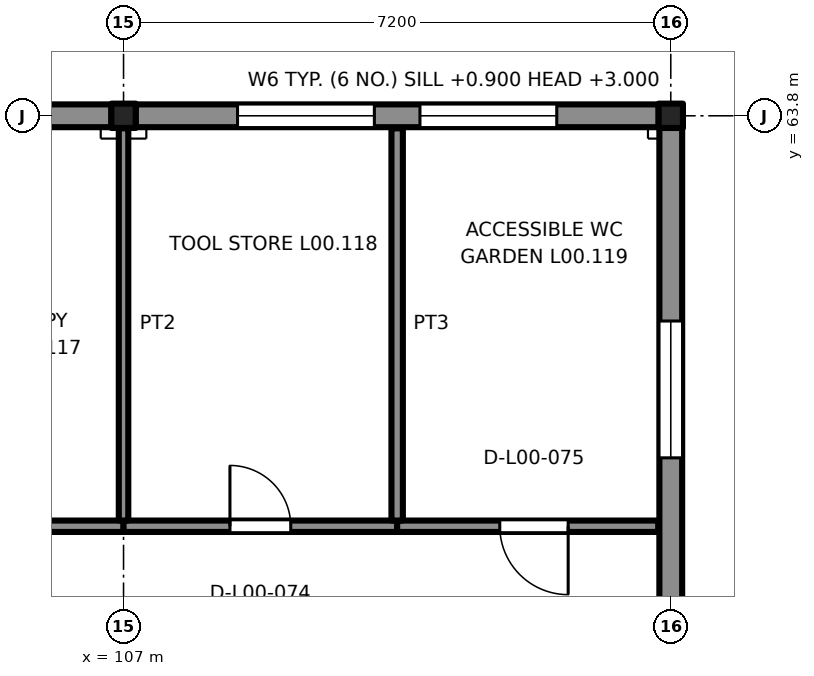
"""IFC4 building model, lengths in metres.
Left out: names, types, materials, properties, quantities, classifications, styles, units other than length and angle.
Written with IfcOpenShell. Run it as: python <this file> out.ifc"""

import sys

from ifc_helpers import new_model, si_unit, direction, frame, frame_2d, origin, origin_2d, place, context, subcontext, project, spatial, rectangle, extrude, element, fill, save


model = new_model("IFC4")
c1 = context("Model", 3, precision=1e-05, world=origin(), true_north=direction((0.0, 1.0)))
c2 = subcontext(c1, "Body", "Model", "MODEL_VIEW")
j1 = project(units=[si_unit("LENGTHUNIT", "METRE"), si_unit("PLANEANGLEUNIT", "RADIAN")], contexts=[c1])
p1 = place(None, origin())
s1 = spatial("IfcSite", under=j1, at=p1, CompositionType="ELEMENT")
p2 = place(p1, origin())
s2 = spatial("IfcBuilding", under=s1, at=p2, CompositionType="ELEMENT")
p3 = place(p2, origin())
s3 = spatial("IfcBuildingStorey", under=s2, at=p3, CompositionType="ELEMENT", Elevation=0.0)
for number, where, z_axis, x_axis in (
    (1, (107.0, 63.8, -0.2), (0.0, 0.0, 1.0), (1.0, 0.0, 0.0)),
    (2, (114.2, 63.8, -0.2), (0.0, 0.0, 1.0), (1.0, 0.0, 0.0)),
):
    element("IfcColumn", number, at=place(p3, frame(where, z_axis=z_axis, x_axis=x_axis)), inside=s3, PredefinedType="COLUMN", context=c2, shape_type="SweptSolid", body=[
        extrude(rectangle(XDim=0.32, YDim=0.32, at=origin_2d()), origin(), (0.0, 0.0, 1.0), 4.3),
    ])
p4 = place(p3, frame((99.96, 63.8, 0.0), z_axis=(0.0, 0.0, 1.0), x_axis=(1.0, 0.0, 0.0)))
e3 = element("IfcWall", 3, at=p4, inside=s3, PredefinedType="SOLIDWALL", context=c2, shape_type="SweptSolid", body=[
    extrude(rectangle(XDim=6.88, YDim=0.33, at=frame_2d((3.44, 0.0))), origin(), (0.0, 0.0, 1.0), 0.45),
])
p5 = place(p3, frame((99.96, 63.8, 0.45), z_axis=(0.0, 0.0, 1.0), x_axis=(1.0, 0.0, 0.0)))
e4 = element("IfcWall", 4, at=p5, inside=s3, PredefinedType="PARTITIONING", context=c2, shape_type="SweptSolid", body=[
    extrude(rectangle(XDim=6.88, YDim=0.3, at=frame_2d((3.44, 0.0))), origin(), (0.0, 0.0, 1.0), 3.35),
])
p6 = place(p5, frame((2.54, 0.0, 0.45)))
e5 = element("IfcOpeningElement", 5, at=p6, cuts=e4, PredefinedType="OPENING", context=c2, shape_type="SweptSolid", body=[
    extrude(rectangle(XDim=1.8, YDim=2.1, at=frame_2d((0.9, 1.05))), frame((0.0, 0.16, 0.0), z_axis=(0.0, -1.0, 0.0), x_axis=(1.0, 0.0, 0.0)), (0.0, 0.0, 1.0), 0.32),
])
p7 = place(p3, frame((107.16, 63.8, 0.0), z_axis=(0.0, 0.0, 1.0), x_axis=(1.0, 0.0, 0.0)))
e6 = element("IfcWall", 6, at=p7, inside=s3, PredefinedType="SOLIDWALL", context=c2, shape_type="SweptSolid", body=[
    extrude(rectangle(XDim=6.88, YDim=0.33, at=frame_2d((3.44, 0.0))), origin(), (0.0, 0.0, 1.0), 0.45),
])
p8 = place(p3, frame((107.16, 63.8, 0.45), z_axis=(0.0, 0.0, 1.0), x_axis=(1.0, 0.0, 0.0)))
e7 = element("IfcWall", 7, at=p8, inside=s3, PredefinedType="PARTITIONING", context=c2, shape_type="SweptSolid", body=[
    extrude(rectangle(XDim=6.88, YDim=0.3, at=frame_2d((3.44, 0.0))), origin(), (0.0, 0.0, 1.0), 3.35),
])
p9 = place(p8, frame((1.34, 0.0, 0.45)))
e8 = element("IfcOpeningElement", 8, at=p9, cuts=e7, PredefinedType="OPENING", context=c2, shape_type="SweptSolid", body=[
    extrude(rectangle(XDim=1.8, YDim=2.1, at=frame_2d((0.9, 1.05))), frame((0.0, 0.16, 0.0), z_axis=(0.0, -1.0, 0.0), x_axis=(1.0, 0.0, 0.0)), (0.0, 0.0, 1.0), 0.32),
])
p10 = place(p8, frame((3.74, 0.0, 0.45)))
e9 = element("IfcOpeningElement", 9, at=p10, cuts=e7, PredefinedType="OPENING", context=c2, shape_type="SweptSolid", body=[
    extrude(rectangle(XDim=1.8, YDim=2.1, at=frame_2d((0.9, 1.05))), frame((0.0, 0.16, 0.0), z_axis=(0.0, -1.0, 0.0), x_axis=(1.0, 0.0, 0.0)), (0.0, 0.0, 1.0), 0.32),
])
p11 = place(p3, frame((114.2, 63.64, 0.0), z_axis=(0.0, 0.0, 1.0), x_axis=(0.0, -1.0, 0.0)))
e10 = element("IfcWall", 10, at=p11, inside=s3, PredefinedType="SOLIDWALL", context=c2, shape_type="SweptSolid", body=[
    extrude(rectangle(XDim=6.88, YDim=0.33, at=frame_2d((3.44, 0.0))), origin(), (0.0, 0.0, 1.0), 0.45),
])
p12 = place(p3, frame((114.2, 63.64, 0.45), z_axis=(0.0, 0.0, 1.0), x_axis=(0.0, -1.0, 0.0)))
e11 = element("IfcWall", 11, at=p12, inside=s3, PredefinedType="PARTITIONING", context=c2, shape_type="SweptSolid", body=[
    extrude(rectangle(XDim=6.88, YDim=0.3, at=frame_2d((3.44, 0.0))), origin(), (0.0, 0.0, 1.0), 3.35),
])
p13 = place(p12, frame((2.54, 0.0, 0.45)))
e12 = element("IfcOpeningElement", 12, at=p13, cuts=e11, PredefinedType="OPENING", context=c2, shape_type="SweptSolid", body=[
    extrude(rectangle(XDim=1.8, YDim=2.1, at=frame_2d((0.9, 1.05))), frame((0.0, 0.16, 0.0), z_axis=(0.0, -1.0, 0.0), x_axis=(1.0, 0.0, 0.0)), (0.0, 0.0, 1.0), 0.32),
])
p14 = place(p3, frame((99.8, 58.4, 0.0), z_axis=(0.0, 0.0, 1.0), x_axis=(1.0, 0.0, 0.0)))
e13 = element("IfcWall", 13, at=p14, inside=s3, PredefinedType="PARTITIONING", context=c2, shape_type="SweptSolid", body=[
    extrude(rectangle(XDim=7.2, YDim=0.15, at=frame_2d((3.6, 0.0))), origin(), (0.0, 0.0, 1.0), 4.382),
])
p15 = place(p14, frame((1.3, 0.0, 0.0)))
e14 = element("IfcOpeningElement", 14, at=p15, cuts=e13, PredefinedType="OPENING", context=c2, shape_type="SweptSolid", body=[
    extrude(rectangle(XDim=1.0, YDim=2.1, at=frame_2d((0.5, 1.05))), frame((0.0, 0.085, 0.0), z_axis=(0.0, -1.0, 0.0), x_axis=(1.0, 0.0, 0.0)), (0.0, 0.0, 1.0), 0.17),
])
p16 = place(p3, frame((107.0, 58.4, 0.0), z_axis=(0.0, 0.0, 1.0), x_axis=(1.0, 0.0, 0.0)))
e15 = element("IfcWall", 15, at=p16, inside=s3, PredefinedType="PARTITIONING", context=c2, shape_type="SweptSolid", body=[
    extrude(rectangle(XDim=3.6, YDim=0.15, at=frame_2d((1.8, 0.0))), origin(), (0.0, 0.0, 1.0), 4.382),
])
p17 = place(p16, frame((1.4, 0.0, 0.0)))
e16 = element("IfcOpeningElement", 16, at=p17, cuts=e15, PredefinedType="OPENING", context=c2, shape_type="SweptSolid", body=[
    extrude(rectangle(XDim=0.8, YDim=2.1, at=frame_2d((0.4, 1.05))), frame((0.0, 0.085, 0.0), z_axis=(0.0, -1.0, 0.0), x_axis=(1.0, 0.0, 0.0)), (0.0, 0.0, 1.0), 0.17),
])
p18 = place(p3, frame((107.0, 63.635, 0.0), z_axis=(0.0, 0.0, 1.0), x_axis=(0.0, -1.0, 0.0)))
e17 = element("IfcWall", 17, at=p18, inside=s3, PredefinedType="PARTITIONING", context=c2, shape_type="SweptSolid", body=[
    extrude(rectangle(XDim=5.16, YDim=0.125, at=frame_2d((2.58, 0.0))), origin(), (0.0, 0.0, 1.0), 4.382),
])
p19 = place(p3, frame((114.035, 58.4, 0.0), z_axis=(0.0, 0.0, 1.0), x_axis=(-1.0, 0.0, 0.0)))
e18 = element("IfcWall", 18, at=p19, inside=s3, PredefinedType="PARTITIONING", context=c2, shape_type="SweptSolid", body=[
    extrude(rectangle(XDim=3.435, YDim=0.15, at=frame_2d((1.717, 0.0))), origin(), (0.0, 0.0, 1.0), 4.382),
])
p20 = place(p19, frame((1.185, 0.0, 0.0)))
e19 = element("IfcOpeningElement", 19, at=p20, cuts=e18, PredefinedType="OPENING", context=c2, shape_type="SweptSolid", body=[
    extrude(rectangle(XDim=0.9, YDim=2.1, at=frame_2d((0.45, 1.05))), frame((0.0, 0.085, 0.0), z_axis=(0.0, -1.0, 0.0), x_axis=(1.0, 0.0, 0.0)), (0.0, 0.0, 1.0), 0.17),
])
p21 = place(p3, frame((110.6, 63.635, 0.0), z_axis=(0.0, 0.0, 1.0), x_axis=(0.0, -1.0, 0.0)))
e20 = element("IfcWall", 20, at=p21, inside=s3, PredefinedType="PARTITIONING", context=c2, shape_type="SweptSolid", body=[
    extrude(rectangle(XDim=5.16, YDim=0.15, at=frame_2d((2.58, 0.0))), origin(), (0.0, 0.0, 1.0), 4.382),
])
p22 = place(p9, origin())
e21 = element("IfcWindow", 21, at=p22, inside=s3, PartitioningType="SINGLE_PANEL", PredefinedType="WINDOW", context=c2, shape_type="SweptSolid", body=[
    extrude(rectangle(XDim=1.8, YDim=2.1, at=frame_2d((0.9, 1.05))), frame((0.0, 0.03, 0.0), z_axis=(0.0, -1.0, 0.0), x_axis=(1.0, 0.0, 0.0)), (0.0, 0.0, 1.0), 0.06),
])
fill(e8, e21)
p23 = place(p10, origin())
e22 = element("IfcWindow", 22, at=p23, inside=s3, PartitioningType="SINGLE_PANEL", PredefinedType="WINDOW", context=c2, shape_type="SweptSolid", body=[
    extrude(rectangle(XDim=1.8, YDim=2.1, at=frame_2d((0.9, 1.05))), frame((0.0, 0.03, 0.0), z_axis=(0.0, -1.0, 0.0), x_axis=(1.0, 0.0, 0.0)), (0.0, 0.0, 1.0), 0.06),
])
fill(e9, e22)
p24 = place(p13, origin())
e23 = element("IfcWindow", 23, at=p24, inside=s3, PartitioningType="SINGLE_PANEL", PredefinedType="WINDOW", context=c2, shape_type="SweptSolid", body=[
    extrude(rectangle(XDim=1.8, YDim=2.1, at=frame_2d((0.9, 1.05))), frame((0.0, 0.03, 0.0), z_axis=(0.0, -1.0, 0.0), x_axis=(1.0, 0.0, 0.0)), (0.0, 0.0, 1.0), 0.06),
])
fill(e12, e23)
p25 = place(p17, origin())
e24 = element("IfcDoor", 24, at=p25, inside=s3, OperationType="SINGLE_SWING_LEFT", PredefinedType="DOOR", context=c2, shape_type="SweptSolid", body=[
    extrude(rectangle(XDim=0.8, YDim=2.1, at=frame_2d((0.4, 1.05))), frame((0.0, 0.025, 0.0), z_axis=(0.0, -1.0, 0.0), x_axis=(1.0, 0.0, 0.0)), (0.0, 0.0, 1.0), 0.05),
])
fill(e16, e24)
p26 = place(p20, origin())
e25 = element("IfcDoor", 25, at=p26, inside=s3, OperationType="SINGLE_SWING_LEFT", PredefinedType="DOOR", context=c2, shape_type="SweptSolid", body=[
    extrude(rectangle(XDim=0.9, YDim=2.1, at=frame_2d((0.45, 1.05))), frame((0.0, 0.025, 0.0), z_axis=(0.0, -1.0, 0.0), x_axis=(1.0, 0.0, 0.0)), (0.0, 0.0, 1.0), 0.05),
])
fill(e19, e25)
save(model, sys.argv[1])
